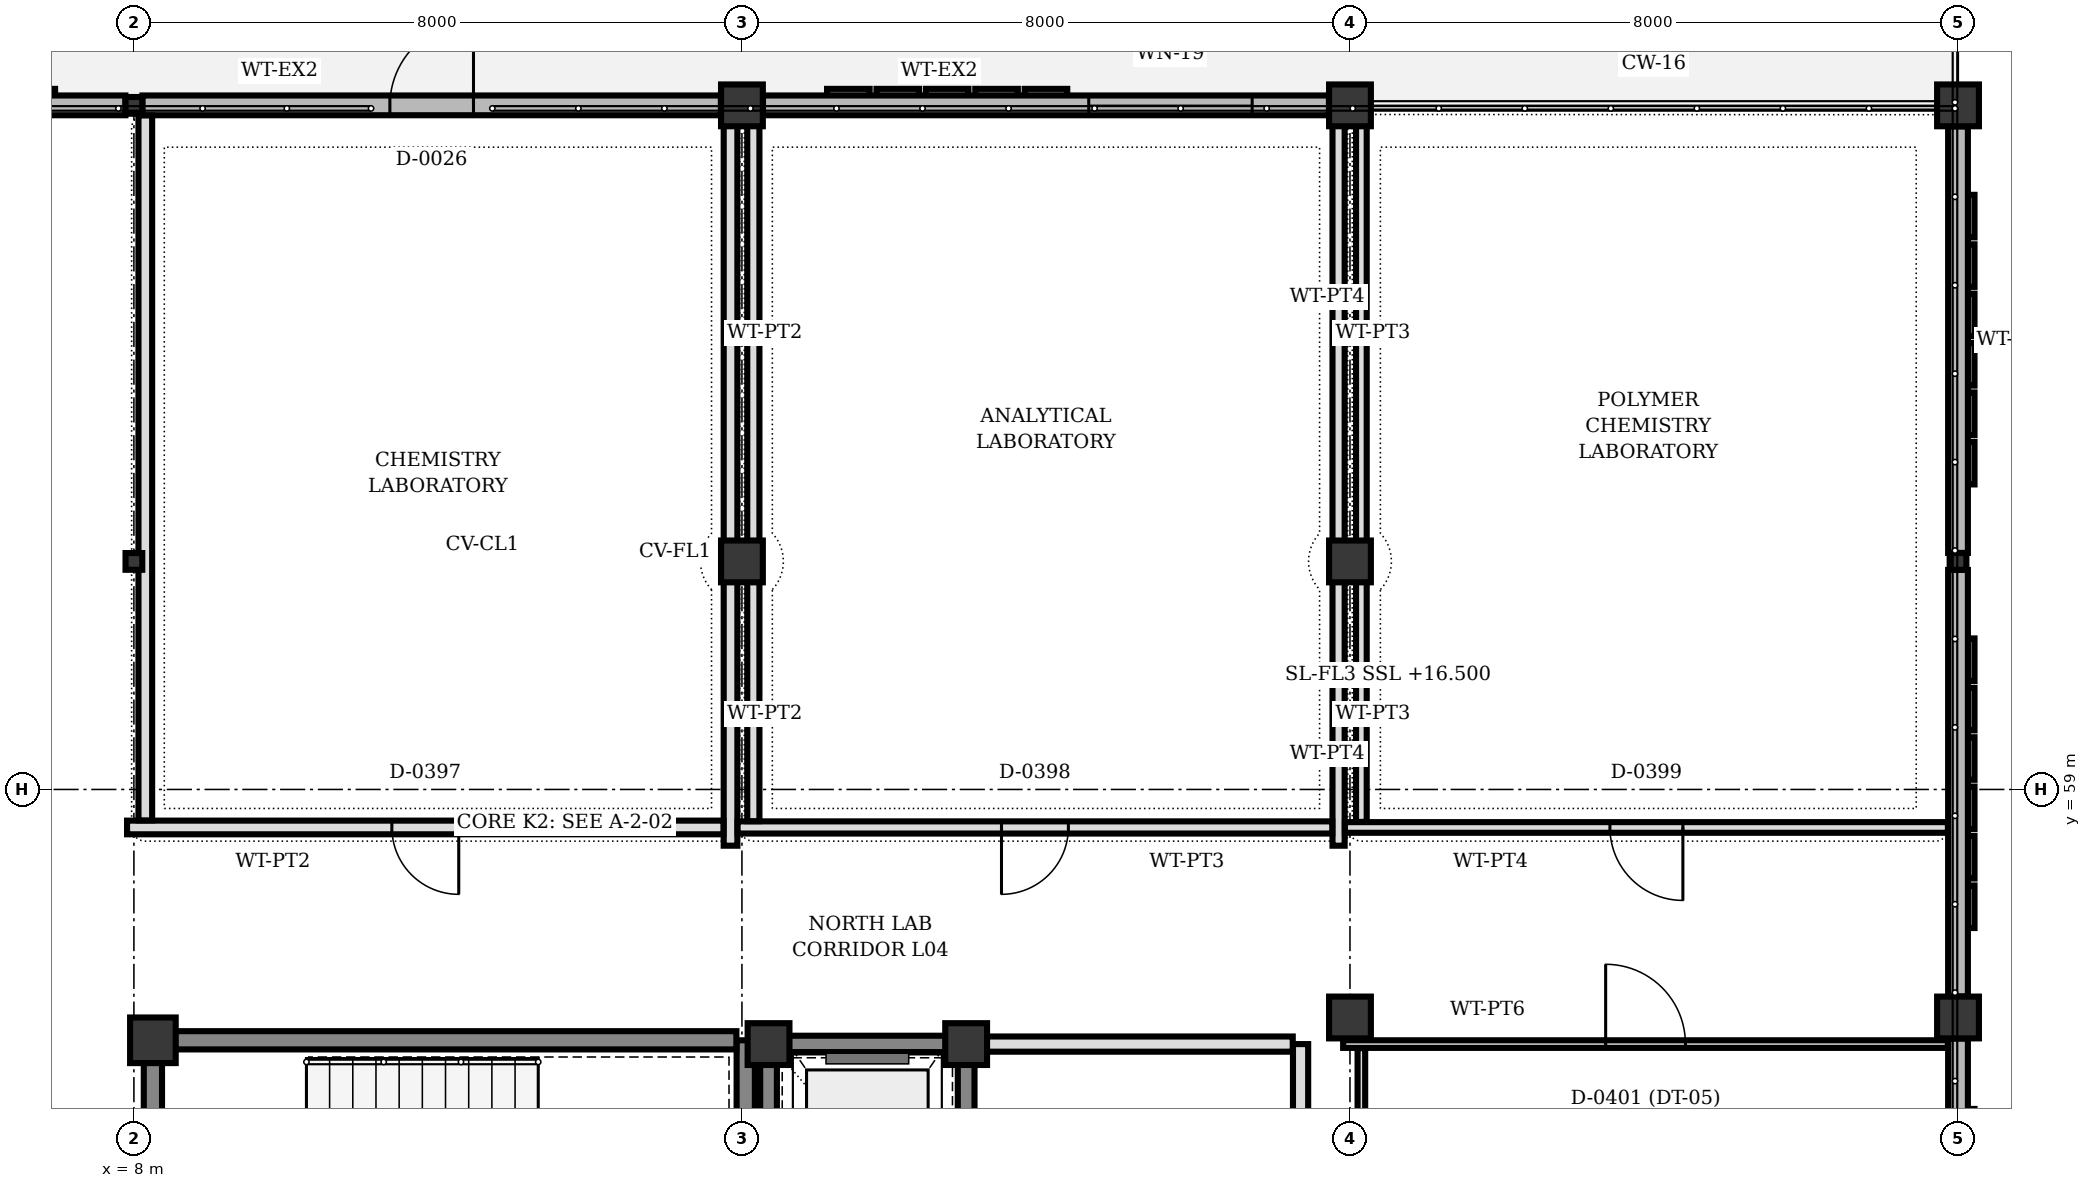
"""IFC4 building model, lengths in metres.
Left out: names, types, materials, properties, quantities, classifications, styles, units other than length and angle.
Written with IfcOpenShell. Run it as: python <this file> out.ifc"""

import sys

from ifc_helpers import new_model, si_unit, direction, frame, frame_2d, origin, origin_2d, place, context, subcontext, project, spatial, rectangle, hollow_rectangle, extrude, element, fill, save


model = new_model("IFC4")
c1 = context("Model", 3, precision=1e-05, world=origin(), true_north=direction((0.0, 1.0)))
c2 = subcontext(c1, "Body", "Model", "MODEL_VIEW")
j1 = project(units=[si_unit("LENGTHUNIT", "METRE"), si_unit("PLANEANGLEUNIT", "RADIAN")], contexts=[c1])
p1 = place(None, origin())
s1 = spatial("IfcSite", under=j1, at=p1, CompositionType="ELEMENT")
p2 = place(p1, origin())
s2 = spatial("IfcBuilding", under=s1, at=p2, CompositionType="ELEMENT")
p3 = place(p2, frame((0.0, 0.0, 16.5)))
s3 = spatial("IfcBuildingStorey", under=s2, at=p3, CompositionType="ELEMENT", Elevation=16.5)
p4 = place(p3, frame((8.25, 55.7, 0.0), z_axis=(0.0, 0.0, 1.0), x_axis=(1.0, 0.0, 0.0)))
e1 = element("IfcColumn", 1, at=p4, inside=s3, PredefinedType="COLUMN", context=c2, shape_type="SweptSolid", body=[
    extrude(rectangle(XDim=0.6, YDim=0.6, at=origin_2d()), origin(), (0.0, 0.0, 1.0), 4.0),
])
for number, where, z_axis, x_axis in (
    (2, (18.95, 55.65, 0.0), (0.0, 0.0, 1.0), (1.0, 0.0, 0.0)),
    (3, (16.35, 55.65, 0.0), (0.0, 0.0, 1.0), (1.0, 0.0, 0.0)),
    (4, (16.0, 62.0, 0.0), (0.0, 0.0, 1.0), (1.0, 0.0, 0.0)),
    (5, (16.0, 68.0, 0.0), (0.0, 0.0, 1.0), (1.0, 0.0, 0.0)),
    (6, (24.0, 56.0, 0.0), (0.0, 0.0, 1.0), (1.0, 0.0, 0.0)),
    (7, (24.0, 62.0, 0.0), (0.0, 0.0, 1.0), (1.0, 0.0, 0.0)),
    (8, (24.0, 68.0, 0.0), (0.0, 0.0, 1.0), (1.0, 0.0, 0.0)),
    (9, (32.0, 56.0, 0.0), (0.0, 0.0, 1.0), (1.0, 0.0, 0.0)),
):
    element("IfcColumn", number, at=place(p3, frame(where, z_axis=z_axis, x_axis=x_axis)), inside=s3, PredefinedType="COLUMN", context=c2, shape_type="SweptSolid", body=[
        extrude(rectangle(XDim=0.55, YDim=0.55, at=origin_2d()), origin(), (0.0, 0.0, 1.0), 4.0),
    ])
p5 = place(p3, frame((32.0, 62.0, 0.0), z_axis=(0.0, 0.0, 1.0), x_axis=(1.0, 0.0, 0.0)))
e10 = element("IfcColumn", 10, at=p5, inside=s3, PredefinedType="COLUMN", context=c2, shape_type="SweptSolid", body=[
    extrude(hollow_rectangle(XDim=0.22, YDim=0.22, WallThickness=0.01, at=origin_2d()), origin(), (0.0, 0.0, 1.0), 4.0),
])
p6 = place(p3, frame((32.0, 68.0, 0.0), z_axis=(0.0, 0.0, 1.0), x_axis=(1.0, 0.0, 0.0)))
e11 = element("IfcColumn", 11, at=p6, inside=s3, PredefinedType="COLUMN", context=c2, shape_type="SweptSolid", body=[
    extrude(rectangle(XDim=0.55, YDim=0.55, at=origin_2d()), origin(), (0.0, 0.0, 1.0), 4.0),
])
for number, where, z_axis, x_axis in (
    (12, (8.0, 62.0, 0.0), (0.0, 0.0, 1.0), (1.0, 0.0, 0.0)),
    (13, (8.0, 68.0, 0.0), (0.0, 0.0, 1.0), (1.0, 0.0, 0.0)),
):
    element("IfcColumn", number, at=place(p3, frame(where, z_axis=z_axis, x_axis=x_axis)), inside=s3, PredefinedType="COLUMN", context=c2, shape_type="SweptSolid", body=[
        extrude(hollow_rectangle(XDim=0.22, YDim=0.22, WallThickness=0.01, at=origin_2d()), origin(), (0.0, 0.0, 1.0), 4.0),
    ])
p7 = place(p3, frame((0.277, 68.0, 0.0), z_axis=(0.0, 0.0, 1.0), x_axis=(1.0, 0.0, 0.0)))
e14 = element("IfcWall", 14, at=p7, inside=s3, PredefinedType="SOLIDWALL", context=c2, shape_type="SweptSolid", body=[
    extrude(rectangle(XDim=7.611, YDim=0.26, at=frame_2d((3.805, 0.0))), origin(), (0.0, 0.0, 1.0), 3.068),
])
p8 = place(p7, frame((1.233, 0.0, 0.9)))
e15 = element("IfcOpeningElement", 15, at=p8, cuts=e14, PredefinedType="OPENING", context=c2, shape_type="SweptSolid", body=[
    extrude(rectangle(XDim=2.1, YDim=1.1, at=frame_2d((1.05, 0.55))), frame((0.0, 0.14, 0.0), z_axis=(0.0, -1.0, 0.0), x_axis=(1.0, 0.0, 0.0)), (0.0, 0.0, 1.0), 0.28),
])
p9 = place(p3, frame((8.112, 68.0, 0.0), z_axis=(0.0, 0.0, 1.0), x_axis=(1.0, 0.0, 0.0)))
e16 = element("IfcWall", 16, at=p9, inside=s3, PredefinedType="SOLIDWALL", context=c2, shape_type="SweptSolid", body=[
    extrude(rectangle(XDim=7.611, YDim=0.26, at=frame_2d((3.805, 0.0))), origin(), (0.0, 0.0, 1.0), 3.068),
])
p10 = place(p9, frame((3.256, 0.0, 0.0)))
e17 = element("IfcOpeningElement", 17, at=p10, cuts=e16, PredefinedType="OPENING", context=c2, shape_type="SweptSolid", body=[
    extrude(rectangle(XDim=1.1, YDim=2.25, at=frame_2d((0.55, 1.125))), frame((0.0, 0.14, 0.0), z_axis=(0.0, -1.0, 0.0), x_axis=(1.0, 0.0, 0.0)), (0.0, 0.0, 1.0), 0.28),
])
p11 = place(p3, frame((16.277, 68.0, 0.0), z_axis=(0.0, 0.0, 1.0), x_axis=(1.0, 0.0, 0.0)))
e18 = element("IfcWall", 18, at=p11, inside=s3, PredefinedType="SOLIDWALL", context=c2, shape_type="SweptSolid", body=[
    extrude(rectangle(XDim=7.446, YDim=0.26, at=frame_2d((3.723, 0.0))), origin(), (0.0, 0.0, 1.0), 3.068),
])
p12 = place(p11, frame((4.286, 0.0, 0.9)))
e19 = element("IfcOpeningElement", 19, at=p12, cuts=e18, PredefinedType="OPENING", context=c2, shape_type="SweptSolid", body=[
    extrude(rectangle(XDim=2.15, YDim=1.25, at=frame_2d((1.075, 0.625))), frame((0.0, 0.14, 0.0), z_axis=(0.0, -1.0, 0.0), x_axis=(1.0, 0.0, 0.0)), (0.0, 0.0, 1.0), 0.28),
])
for number, where, z_axis, x_axis in (
    (20, (32.0, 67.723, 0.0), (0.0, 0.0, 1.0), (0.0, -1.0, 0.0)),
    (21, (32.0, 61.888, 0.0), (0.0, 0.0, 1.0), (0.0, -1.0, 0.0)),
):
    element("IfcWall", number, at=place(p3, frame(where, z_axis=z_axis, x_axis=x_axis)), inside=s3, PredefinedType="SOLIDWALL", context=c2, shape_type="SweptSolid", body=[
        extrude(rectangle(XDim=5.611, YDim=0.26, at=frame_2d((2.805, 0.0))), origin(), (0.0, 0.0, 1.0), 3.068),
    ])
p13 = place(p3, frame((32.0, 55.723, 0.0), z_axis=(0.0, 0.0, 1.0), x_axis=(0.0, -1.0, 0.0)))
e22 = element("IfcWall", 22, at=p13, inside=s3, PredefinedType="SOLIDWALL", context=c2, shape_type="SweptSolid", body=[
    extrude(rectangle(XDim=7.611, YDim=0.26, at=frame_2d((3.805, 0.0))), origin(), (0.0, 0.0, 1.0), 3.149),
])
p14 = place(p3, frame((8.25, 51.092, 0.0), z_axis=(0.0, 0.0, 1.0), x_axis=(0.0, 1.0, 0.0)))
e23 = element("IfcWall", 23, at=p14, inside=s3, PredefinedType="SHEAR", context=c2, shape_type="SweptSolid", body=[
    extrude(rectangle(XDim=4.316, YDim=0.24, at=frame_2d((2.158, 0.0))), origin(), (0.0, 0.0, 1.0), 3.74),
])
p15 = place(p3, frame((16.05, 55.7, 0.0), z_axis=(0.0, 0.0, 1.0), x_axis=(0.0, -1.0, 0.0)))
e24 = element("IfcWall", 24, at=p15, inside=s3, PredefinedType="SHEAR", context=c2, shape_type="SweptSolid", body=[
    extrude(rectangle(XDim=4.608, YDim=0.24, at=frame_2d((2.304, 0.0))), origin(), (0.0, 0.0, 1.0), 3.74),
])
p16 = place(p3, frame((15.927, 55.7, 0.0), z_axis=(0.0, 0.0, 1.0), x_axis=(-1.0, 0.0, 0.0)))
e25 = element("IfcWall", 25, at=p16, inside=s3, PredefinedType="SHEAR", context=c2, shape_type="SweptSolid", body=[
    extrude(rectangle(XDim=7.385, YDim=0.24, at=frame_2d((3.692, 0.0))), origin(), (0.0, 0.0, 1.0), 3.74),
])
p17 = place(p3, frame((18.95, 52.917, 0.0), z_axis=(0.0, 0.0, 1.0), x_axis=(0.0, 1.0, 0.0)))
e26 = element("IfcWall", 26, at=p17, inside=s3, PredefinedType="SHEAR", context=c2, shape_type="SweptSolid", body=[
    extrude(rectangle(XDim=2.466, YDim=0.22, at=frame_2d((1.233, 0.0))), origin(), (0.0, 0.0, 1.0), 3.74),
])
p18 = place(p17, frame((0.683, 0.0, 0.0)))
e27 = element("IfcOpeningElement", 27, at=p18, cuts=e26, PredefinedType="OPENING", context=c2, shape_type="SweptSolid", body=[
    extrude(rectangle(XDim=1.1, YDim=2.15, at=frame_2d((0.55, 1.075))), frame((0.0, 0.12, 0.0), z_axis=(0.0, -1.0, 0.0), x_axis=(1.0, 0.0, 0.0)), (0.0, 0.0, 1.0), 0.24),
])
p19 = place(p3, frame((18.683, 55.65, 0.0), z_axis=(0.0, 0.0, 1.0), x_axis=(-1.0, 0.0, 0.0)))
e28 = element("IfcWall", 28, at=p19, inside=s3, PredefinedType="SHEAR", context=c2, shape_type="SweptSolid", body=[
    extrude(rectangle(XDim=2.066, YDim=0.22, at=frame_2d((1.033, 0.0))), origin(), (0.0, 0.0, 1.0), 3.74),
])
p20 = place(p3, frame((16.35, 55.383, 0.0), z_axis=(0.0, 0.0, 1.0), x_axis=(0.0, -1.0, 0.0)))
e29 = element("IfcWall", 29, at=p20, inside=s3, PredefinedType="SHEAR", context=c2, shape_type="SweptSolid", body=[
    extrude(rectangle(XDim=2.466, YDim=0.22, at=frame_2d((1.233, 0.0))), origin(), (0.0, 0.0, 1.0), 3.74),
])
p21 = place(p3, frame((23.35, 50.85, 0.0), z_axis=(0.0, 0.0, 1.0), x_axis=(0.0, 1.0, 0.0)))
e30 = element("IfcWall", 30, at=p21, inside=s3, PredefinedType="PARTITIONING", context=c2, shape_type="SweptSolid", body=[
    extrude(rectangle(XDim=4.8, YDim=0.2, at=frame_2d((2.4, 0.0))), origin(), (0.0, 0.0, 1.0), 3.7),
])
p22 = place(p3, frame((19.217, 55.65, 0.0), z_axis=(0.0, 0.0, 1.0), x_axis=(1.0, 0.0, 0.0)))
e31 = element("IfcWall", 31, at=p22, inside=s3, PredefinedType="PARTITIONING", context=c2, shape_type="SweptSolid", body=[
    extrude(rectangle(XDim=4.03, YDim=0.2, at=frame_2d((2.015, 0.0))), origin(), (0.0, 0.0, 1.0), 3.7),
])
p23 = place(p3, frame((15.85, 67.733, 0.0), z_axis=(0.0, 0.0, 1.0), x_axis=(0.0, -1.0, 0.0)))
e32 = element("IfcWall", 32, at=p23, inside=s3, PredefinedType="PARTITIONING", context=c2, shape_type="SweptSolid", body=[
    extrude(rectangle(XDim=5.466, YDim=0.18, at=frame_2d((2.733, 0.0))), origin(), (0.0, 0.0, 1.0), 3.068),
])
p24 = place(p3, frame((15.85, 61.733, 0.0), z_axis=(0.0, 0.0, 1.0), x_axis=(0.0, -1.0, 0.0)))
e33 = element("IfcWall", 33, at=p24, inside=s3, PredefinedType="PARTITIONING", context=c2, shape_type="SweptSolid", body=[
    extrude(rectangle(XDim=3.473, YDim=0.18, at=frame_2d((1.736, 0.0))), origin(), (0.0, 0.0, 1.0), 3.068),
])
p25 = place(p3, frame((15.757, 58.5, 0.0), z_axis=(0.0, 0.0, 1.0), x_axis=(-1.0, 0.0, 0.0)))
e34 = element("IfcWall", 34, at=p25, inside=s3, PredefinedType="PARTITIONING", context=c2, shape_type="SweptSolid", body=[
    extrude(rectangle(XDim=7.847, YDim=0.18, at=frame_2d((3.924, 0.0))), origin(), (0.0, 0.0, 1.0), 3.7),
])
p26 = place(p25, frame((3.483, 0.0, 0.0)))
e35 = element("IfcOpeningElement", 35, at=p26, cuts=e34, PredefinedType="OPENING", context=c2, shape_type="SweptSolid", body=[
    extrude(rectangle(XDim=0.88, YDim=2.1, at=frame_2d((0.44, 1.05))), frame((0.0, 0.1, 0.0), z_axis=(0.0, -1.0, 0.0), x_axis=(1.0, 0.0, 0.0)), (0.0, 0.0, 1.0), 0.2),
])
p27 = place(p3, frame((8.15, 58.593, 0.0), z_axis=(0.0, 0.0, 1.0), x_axis=(0.0, 1.0, 0.0)))
e36 = element("IfcWall", 36, at=p27, inside=s3, PredefinedType="PARTITIONING", context=c2, shape_type="SweptSolid", body=[
    extrude(rectangle(XDim=9.274, YDim=0.18, at=frame_2d((4.637, 0.0))), origin(), (0.0, 0.0, 1.0), 3.068),
])
p28 = place(p3, frame((23.85, 67.733, 0.0), z_axis=(0.0, 0.0, 1.0), x_axis=(0.0, -1.0, 0.0)))
e37 = element("IfcWall", 37, at=p28, inside=s3, PredefinedType="PARTITIONING", context=c2, shape_type="SweptSolid", body=[
    extrude(rectangle(XDim=5.466, YDim=0.16, at=frame_2d((2.733, 0.0))), origin(), (0.0, 0.0, 1.0), 3.068),
])
p29 = place(p3, frame((23.85, 61.733, 0.0), z_axis=(0.0, 0.0, 1.0), x_axis=(0.0, -1.0, 0.0)))
e38 = element("IfcWall", 38, at=p29, inside=s3, PredefinedType="PARTITIONING", context=c2, shape_type="SweptSolid", body=[
    extrude(rectangle(XDim=3.473, YDim=0.16, at=frame_2d((1.736, 0.0))), origin(), (0.0, 0.0, 1.0), 3.068),
])
p30 = place(p3, frame((23.767, 58.5, 0.0), z_axis=(0.0, 0.0, 1.0), x_axis=(-1.0, 0.0, 0.0)))
e39 = element("IfcWall", 39, at=p30, inside=s3, PredefinedType="PARTITIONING", context=c2, shape_type="SweptSolid", body=[
    extrude(rectangle(XDim=7.824, YDim=0.16, at=frame_2d((3.912, 0.0))), origin(), (0.0, 0.0, 1.0), 3.295),
])
p31 = place(p30, frame((3.472, 0.0, 0.0)))
e40 = element("IfcOpeningElement", 40, at=p31, cuts=e39, PredefinedType="OPENING", context=c2, shape_type="SweptSolid", body=[
    extrude(rectangle(XDim=0.88, YDim=2.1, at=frame_2d((0.44, 1.05))), frame((0.0, 0.09, 0.0), z_axis=(0.0, -1.0, 0.0), x_axis=(1.0, 0.0, 0.0)), (0.0, 0.0, 1.0), 0.18),
])
p32 = place(p3, frame((16.15, 58.583, 0.0), z_axis=(0.0, 0.0, 1.0), x_axis=(0.0, 1.0, 0.0)))
e41 = element("IfcWall", 41, at=p32, inside=s3, PredefinedType="PARTITIONING", context=c2, shape_type="SweptSolid", body=[
    extrude(rectangle(XDim=3.15, YDim=0.16, at=frame_2d((1.575, 0.0))), origin(), (0.0, 0.0, 1.0), 3.068),
])
p33 = place(p3, frame((16.15, 62.267, 0.0), z_axis=(0.0, 0.0, 1.0), x_axis=(0.0, 1.0, 0.0)))
e42 = element("IfcWall", 42, at=p33, inside=s3, PredefinedType="PARTITIONING", context=c2, shape_type="SweptSolid", body=[
    extrude(rectangle(XDim=5.466, YDim=0.16, at=frame_2d((2.733, 0.0))), origin(), (0.0, 0.0, 1.0), 3.068),
])
p34 = place(p3, frame((31.867, 58.5, 0.0), z_axis=(0.0, 0.0, 1.0), x_axis=(-1.0, 0.0, 0.0)))
e43 = element("IfcWall", 43, at=p34, inside=s3, PredefinedType="PARTITIONING", context=c2, shape_type="SweptSolid", body=[
    extrude(rectangle(XDim=7.934, YDim=0.14, at=frame_2d((3.967, 0.0))), origin(), (0.0, 0.0, 1.0), 3.295),
])
p35 = place(p34, frame((3.487, 0.0, 0.0)))
e44 = element("IfcOpeningElement", 44, at=p35, cuts=e43, PredefinedType="OPENING", context=c2, shape_type="SweptSolid", body=[
    extrude(rectangle(XDim=0.96, YDim=2.1, at=frame_2d((0.48, 1.05))), frame((0.0, 0.08, 0.0), z_axis=(0.0, -1.0, 0.0), x_axis=(1.0, 0.0, 0.0)), (0.0, 0.0, 1.0), 0.16),
])
p36 = place(p3, frame((24.15, 58.573, 0.0), z_axis=(0.0, 0.0, 1.0), x_axis=(0.0, 1.0, 0.0)))
e45 = element("IfcWall", 45, at=p36, inside=s3, PredefinedType="PARTITIONING", context=c2, shape_type="SweptSolid", body=[
    extrude(rectangle(XDim=3.16, YDim=0.14, at=frame_2d((1.58, 0.0))), origin(), (0.0, 0.0, 1.0), 3.068),
])
p37 = place(p3, frame((24.15, 62.267, 0.0), z_axis=(0.0, 0.0, 1.0), x_axis=(0.0, 1.0, 0.0)))
e46 = element("IfcWall", 46, at=p37, inside=s3, PredefinedType="PARTITIONING", context=c2, shape_type="SweptSolid", body=[
    extrude(rectangle(XDim=5.466, YDim=0.14, at=frame_2d((2.733, 0.0))), origin(), (0.0, 0.0, 1.0), 3.068),
])
p38 = place(p3, frame((23.91, 55.65, 0.0), z_axis=(0.0, 0.0, 1.0), x_axis=(1.0, 0.0, 0.0)))
e47 = element("IfcWall", 47, at=p38, inside=s3, PredefinedType="PARTITIONING", context=c2, shape_type="SweptSolid", body=[
    extrude(rectangle(XDim=7.957, YDim=0.1, at=frame_2d((3.979, 0.0))), origin(), (0.0, 0.0, 1.0), 3.223),
])
p39 = place(p38, frame((3.454, 0.0, 0.0)))
e48 = element("IfcOpeningElement", 48, at=p39, cuts=e47, PredefinedType="OPENING", context=c2, shape_type="SweptSolid", body=[
    extrude(rectangle(XDim=1.05, YDim=2.1, at=frame_2d((0.525, 1.05))), frame((0.0, 0.06, 0.0), z_axis=(0.0, -1.0, 0.0), x_axis=(1.0, 0.0, 0.0)), (0.0, 0.0, 1.0), 0.12),
])
p40 = place(p3, frame((24.15, 48.267, 0.0), z_axis=(0.0, 0.0, 1.0), x_axis=(0.0, 1.0, 0.0)))
e49 = element("IfcWall", 49, at=p40, inside=s3, PredefinedType="PARTITIONING", context=c2, shape_type="SweptSolid", body=[
    extrude(rectangle(XDim=7.33, YDim=0.1, at=frame_2d((3.665, 0.0))), origin(), (0.0, 0.0, 1.0), 3.223),
])
p41 = place(p10, origin())
e50 = element("IfcDoor", 50, at=p41, inside=s3, OperationType="SINGLE_SWING_RIGHT", PredefinedType="DOOR", context=c2, shape_type="SweptSolid", body=[
    extrude(rectangle(XDim=1.1, YDim=2.25, at=frame_2d((0.55, 1.125))), frame((0.0, 0.025, 0.0), z_axis=(0.0, -1.0, 0.0), x_axis=(1.0, 0.0, 0.0)), (0.0, 0.0, 1.0), 0.05),
])
fill(e17, e50)
p42 = place(p12, origin())
e51 = element("IfcWindow", 51, at=p42, inside=s3, PartitioningType="SINGLE_PANEL", PredefinedType="WINDOW", context=c2, shape_type="SweptSolid", body=[
    extrude(rectangle(XDim=2.15, YDim=1.25, at=frame_2d((1.075, 0.625))), frame((0.0, 0.03, 0.0), z_axis=(0.0, -1.0, 0.0), x_axis=(1.0, 0.0, 0.0)), (0.0, 0.0, 1.0), 0.06),
])
fill(e19, e51)
p43 = place(p26, origin())
e52 = element("IfcDoor", 52, at=p43, inside=s3, OperationType="SINGLE_SWING_LEFT", PredefinedType="DOOR", context=c2, shape_type="SweptSolid", body=[
    extrude(rectangle(XDim=0.88, YDim=2.1, at=frame_2d((0.44, 1.05))), frame((0.0, 0.025, 0.0), z_axis=(0.0, -1.0, 0.0), x_axis=(1.0, 0.0, 0.0)), (0.0, 0.0, 1.0), 0.05),
])
fill(e35, e52)
p44 = place(p31, origin())
e53 = element("IfcDoor", 53, at=p44, inside=s3, OperationType="SINGLE_SWING_RIGHT", PredefinedType="DOOR", context=c2, shape_type="SweptSolid", body=[
    extrude(rectangle(XDim=0.88, YDim=2.1, at=frame_2d((0.44, 1.05))), frame((0.0, 0.025, 0.0), z_axis=(0.0, -1.0, 0.0), x_axis=(1.0, 0.0, 0.0)), (0.0, 0.0, 1.0), 0.05),
])
fill(e40, e53)
p45 = place(p35, origin())
e54 = element("IfcDoor", 54, at=p45, inside=s3, OperationType="SINGLE_SWING_LEFT", PredefinedType="DOOR", context=c2, shape_type="SweptSolid", body=[
    extrude(rectangle(XDim=0.96, YDim=2.1, at=frame_2d((0.48, 1.05))), frame((0.0, 0.025, 0.0), z_axis=(0.0, -1.0, 0.0), x_axis=(1.0, 0.0, 0.0)), (0.0, 0.0, 1.0), 0.05),
])
fill(e44, e54)
p46 = place(p39, origin())
e55 = element("IfcDoor", 55, at=p46, inside=s3, OperationType="SINGLE_SWING_LEFT", PredefinedType="DOOR", context=c2, shape_type="SweptSolid", body=[
    extrude(rectangle(XDim=1.05, YDim=2.1, at=frame_2d((0.525, 1.05))), frame((0.0, 0.025, 0.0), z_axis=(0.0, -1.0, 0.0), x_axis=(1.0, 0.0, 0.0)), (0.0, 0.0, 1.0), 0.05),
])
fill(e48, e55)
save(model, sys.argv[1])
